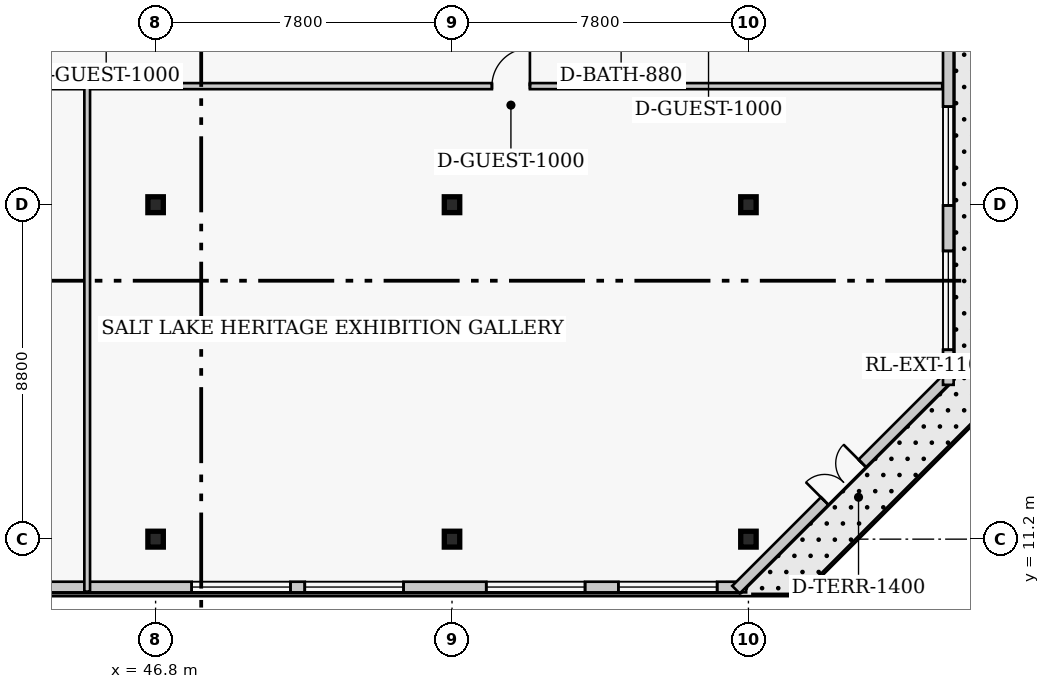
"""IFC4 building model, lengths in metres.
Left out: names, types, materials, properties, quantities, classifications, styles, units other than length and angle.
Written with IfcOpenShell. Run it as: python <this file> out.ifc"""

import sys

from ifc_helpers import new_model, si_unit, direction, frame, frame_2d, origin, origin_2d, place, context, subcontext, project, spatial, rectangle, i_section, extrude, element, fill, save


model = new_model("IFC4")
c1 = context("Model", 3, precision=1e-05, world=origin(), true_north=direction((0.0, 1.0)))
c2 = subcontext(c1, "Body", "Model", "MODEL_VIEW")
j1 = project(units=[si_unit("LENGTHUNIT", "METRE"), si_unit("PLANEANGLEUNIT", "RADIAN")], contexts=[c1])
p1 = place(None, origin())
s1 = spatial("IfcSite", under=j1, at=p1, CompositionType="ELEMENT")
p2 = place(p1, origin())
s2 = spatial("IfcBuilding", under=s1, at=p2, CompositionType="ELEMENT")
p3 = place(p2, frame((0.0, 0.0, 302.0)))
s3 = spatial("IfcBuildingStorey", under=s2, at=p3, CompositionType="ELEMENT", Elevation=302.0)
for number, where, z_axis, x_axis in (
    (1, (46.8, 11.2, 0.0), (0.0, 0.0, 1.0), (1.0, 0.0, 0.0)),
    (2, (46.8, 20.0, 0.0), (0.0, 0.0, 1.0), (1.0, 0.0, 0.0)),
    (3, (54.6, 11.2, 0.0), (0.0, 0.0, 1.0), (1.0, 0.0, 0.0)),
    (4, (54.6, 20.0, 0.0), (0.0, 0.0, 1.0), (1.0, 0.0, 0.0)),
    (5, (62.4, 11.2, 0.0), (0.0, 0.0, 1.0), (1.0, 0.0, 0.0)),
    (6, (62.4, 20.0, 0.0), (0.0, 0.0, 1.0), (1.0, 0.0, 0.0)),
):
    element("IfcColumn", number, at=place(p3, frame(where, z_axis=z_axis, x_axis=x_axis)), inside=s3, PredefinedType="COLUMN", context=c2, shape_type="SweptSolid", body=[
        extrude(i_section(OverallWidth=0.406, OverallDepth=0.417, WebThickness=0.03, FlangeThickness=0.048, FilletRadius=0.017, at=origin_2d()), origin(), (0.0, 0.0, 1.0), 4.6),
    ])
p4 = place(p3, frame((41.71, 9.94, 0.0), z_axis=(0.0, 0.0, 1.0), x_axis=(1.0, 0.0, 0.0)))
e7 = element("IfcWall", 7, at=p4, inside=s3, PredefinedType="SOLIDWALL", context=c2, shape_type="SweptSolid", body=[
    extrude(rectangle(XDim=20.63, YDim=0.28, at=frame_2d((10.315, 0.0))), origin(), (0.0, 0.0, 1.0), 4.31),
])
p5 = place(p4, frame((6.039, 0.0, 0.65)))
e8 = element("IfcOpeningElement", 8, at=p5, cuts=e7, PredefinedType="OPENING", context=c2, shape_type="SweptSolid", body=[
    extrude(rectangle(XDim=2.6, YDim=2.2, at=frame_2d((1.3, 1.1))), frame((0.0, 0.15, 0.0), z_axis=(0.0, -1.0, 0.0), x_axis=(1.0, 0.0, 0.0)), (0.0, 0.0, 1.0), 0.3),
])
p6 = place(p4, frame((9.015, 0.0, 0.65)))
e9 = element("IfcOpeningElement", 9, at=p6, cuts=e7, PredefinedType="OPENING", context=c2, shape_type="SweptSolid", body=[
    extrude(rectangle(XDim=2.6, YDim=2.2, at=frame_2d((1.3, 1.1))), frame((0.0, 0.15, 0.0), z_axis=(0.0, -1.0, 0.0), x_axis=(1.0, 0.0, 0.0)), (0.0, 0.0, 1.0), 0.3),
])
p7 = place(p4, frame((13.791, 0.0, 0.65)))
e10 = element("IfcOpeningElement", 10, at=p7, cuts=e7, PredefinedType="OPENING", context=c2, shape_type="SweptSolid", body=[
    extrude(rectangle(XDim=2.6, YDim=2.2, at=frame_2d((1.3, 1.1))), frame((0.0, 0.15, 0.0), z_axis=(0.0, -1.0, 0.0), x_axis=(1.0, 0.0, 0.0)), (0.0, 0.0, 1.0), 0.3),
])
p8 = place(p4, frame((17.267, 0.0, 0.65)))
e11 = element("IfcOpeningElement", 11, at=p8, cuts=e7, PredefinedType="OPENING", context=c2, shape_type="SweptSolid", body=[
    extrude(rectangle(XDim=2.6, YDim=2.2, at=frame_2d((1.3, 1.1))), frame((0.0, 0.15, 0.0), z_axis=(0.0, -1.0, 0.0), x_axis=(1.0, 0.0, 0.0)), (0.0, 0.0, 1.0), 0.3),
])
p9 = place(p3, frame((62.073, 9.871, 0.0), z_axis=(0.0, 0.0, 1.0), x_axis=(0.707091521591, 0.707122040453, 0.0)))
e12 = element("IfcWall", 12, at=p9, inside=s3, PredefinedType="SOLIDWALL", context=c2, shape_type="SweptSolid", body=[
    extrude(rectangle(XDim=8.0, YDim=0.28, at=frame_2d((4.0, 0.0))), origin(), (0.0, 0.0, 1.0), 4.31),
])
p10 = place(p9, frame((3.3, 0.0, 0.0)))
e13 = element("IfcOpeningElement", 13, at=p10, cuts=e12, PredefinedType="OPENING", context=c2, shape_type="SweptSolid", body=[
    extrude(rectangle(XDim=1.4, YDim=2.15, at=frame_2d((0.7, 1.075))), frame((0.0, 0.15, 0.0), z_axis=(0.0, -1.0, 0.0), x_axis=(1.0, 0.0, 0.0)), (0.0, 0.0, 1.0), 0.3),
])
p11 = place(p3, frame((67.66, 15.26, 0.0), z_axis=(0.0, 0.0, 1.0), x_axis=(0.0, 1.0, 0.0)))
e14 = element("IfcWall", 14, at=p11, inside=s3, PredefinedType="SOLIDWALL", context=c2, shape_type="SweptSolid", body=[
    extrude(rectangle(XDim=26.68, YDim=0.28, at=frame_2d((13.34, 0.0))), origin(), (0.0, 0.0, 1.0), 4.31),
])
p12 = place(p11, frame((0.923, 0.0, 0.65)))
e15 = element("IfcOpeningElement", 15, at=p12, cuts=e14, PredefinedType="OPENING", context=c2, shape_type="SweptSolid", body=[
    extrude(rectangle(XDim=2.6, YDim=2.2, at=frame_2d((1.3, 1.1))), frame((0.0, 0.15, 0.0), z_axis=(0.0, -1.0, 0.0), x_axis=(1.0, 0.0, 0.0)), (0.0, 0.0, 1.0), 0.3),
])
p13 = place(p11, frame((4.72, 0.0, 0.65)))
e16 = element("IfcOpeningElement", 16, at=p13, cuts=e14, PredefinedType="OPENING", context=c2, shape_type="SweptSolid", body=[
    extrude(rectangle(XDim=2.6, YDim=2.2, at=frame_2d((1.3, 1.1))), frame((0.0, 0.15, 0.0), z_axis=(0.0, -1.0, 0.0), x_axis=(1.0, 0.0, 0.0)), (0.0, 0.0, 1.0), 0.3),
])
p14 = place(p11, frame((10.467, 0.0, 0.65)))
e17 = element("IfcOpeningElement", 17, at=p14, cuts=e14, PredefinedType="OPENING", context=c2, shape_type="SweptSolid", body=[
    extrude(rectangle(XDim=2.6, YDim=2.2, at=frame_2d((1.3, 1.1))), frame((0.0, 0.15, 0.0), z_axis=(0.0, -1.0, 0.0), x_axis=(1.0, 0.0, 0.0)), (0.0, 0.0, 1.0), 0.3),
])
p15 = place(p11, frame((14.263, 0.0, 0.65)))
e18 = element("IfcOpeningElement", 18, at=p15, cuts=e14, PredefinedType="OPENING", context=c2, shape_type="SweptSolid", body=[
    extrude(rectangle(XDim=2.6, YDim=2.2, at=frame_2d((1.3, 1.1))), frame((0.0, 0.15, 0.0), z_axis=(0.0, -1.0, 0.0), x_axis=(1.0, 0.0, 0.0)), (0.0, 0.0, 1.0), 0.3),
])
p16 = place(p11, frame((18.71, 0.0, 0.65)))
e19 = element("IfcOpeningElement", 19, at=p16, cuts=e14, PredefinedType="OPENING", context=c2, shape_type="SweptSolid", body=[
    extrude(rectangle(XDim=2.6, YDim=2.2, at=frame_2d((1.3, 1.1))), frame((0.0, 0.15, 0.0), z_axis=(0.0, -1.0, 0.0), x_axis=(1.0, 0.0, 0.0)), (0.0, 0.0, 1.0), 0.3),
])
p17 = place(p11, frame((23.157, 0.0, 0.65)))
e20 = element("IfcOpeningElement", 20, at=p17, cuts=e14, PredefinedType="OPENING", context=c2, shape_type="SweptSolid", body=[
    extrude(rectangle(XDim=2.6, YDim=2.2, at=frame_2d((1.3, 1.1))), frame((0.0, 0.15, 0.0), z_axis=(0.0, -1.0, 0.0), x_axis=(1.0, 0.0, 0.0)), (0.0, 0.0, 1.0), 0.3),
])
p18 = place(p3, frame((10.5, 23.12, 0.0), z_axis=(0.0, 0.0, 1.0), x_axis=(1.0, 0.0, 0.0)))
e21 = element("IfcWall", 21, at=p18, inside=s3, PredefinedType="PARTITIONING", context=c2, shape_type="SweptSolid", body=[
    extrude(rectangle(XDim=57.0, YDim=0.16, at=frame_2d((28.5, 0.0))), origin(), (0.0, 0.0, 1.0), 4.31),
])
p19 = place(p18, frame((8.85, 0.0, 0.0)))
e22 = element("IfcOpeningElement", 22, at=p19, cuts=e21, PredefinedType="OPENING", context=c2, shape_type="SweptSolid", body=[
    extrude(rectangle(XDim=1.0, YDim=2.15, at=frame_2d((0.5, 1.075))), frame((0.0, 0.09, 0.0), z_axis=(0.0, -1.0, 0.0), x_axis=(1.0, 0.0, 0.0)), (0.0, 0.0, 1.0), 0.18),
])
p20 = place(p18, frame((26.0, 0.0, 0.0)))
e23 = element("IfcOpeningElement", 23, at=p20, cuts=e21, PredefinedType="OPENING", context=c2, shape_type="SweptSolid", body=[
    extrude(rectangle(XDim=1.0, YDim=2.15, at=frame_2d((0.5, 1.075))), frame((0.0, 0.09, 0.0), z_axis=(0.0, -1.0, 0.0), x_axis=(1.0, 0.0, 0.0)), (0.0, 0.0, 1.0), 0.18),
])
p21 = place(p18, frame((45.15, 0.0, 0.0)))
e24 = element("IfcOpeningElement", 24, at=p21, cuts=e21, PredefinedType="OPENING", context=c2, shape_type="SweptSolid", body=[
    extrude(rectangle(XDim=1.0, YDim=2.15, at=frame_2d((0.5, 1.075))), frame((0.0, 0.09, 0.0), z_axis=(0.0, -1.0, 0.0), x_axis=(1.0, 0.0, 0.0)), (0.0, 0.0, 1.0), 0.18),
])
p22 = place(p3, frame((45.0, 9.82, 0.0), z_axis=(0.0, 0.0, 1.0), x_axis=(0.0, 1.0, 0.0)))
e25 = element("IfcWall", 25, at=p22, inside=s3, PredefinedType="PARTITIONING", context=c2, shape_type="SweptSolid", body=[
    extrude(rectangle(XDim=13.3, YDim=0.15, at=frame_2d((6.65, 0.0))), origin(), (0.0, 0.0, 1.0), 4.31),
])
p23 = place(p5, origin())
e26 = element("IfcWindow", 26, at=p23, inside=s3, PartitioningType="SINGLE_PANEL", PredefinedType="WINDOW", context=c2, shape_type="SweptSolid", body=[
    extrude(rectangle(XDim=2.6, YDim=2.2, at=frame_2d((1.3, 1.1))), frame((0.0, 0.03, 0.0), z_axis=(0.0, -1.0, 0.0), x_axis=(1.0, 0.0, 0.0)), (0.0, 0.0, 1.0), 0.06),
])
fill(e8, e26)
p24 = place(p6, origin())
e27 = element("IfcWindow", 27, at=p24, inside=s3, PartitioningType="SINGLE_PANEL", PredefinedType="WINDOW", context=c2, shape_type="SweptSolid", body=[
    extrude(rectangle(XDim=2.6, YDim=2.2, at=frame_2d((1.3, 1.1))), frame((0.0, 0.03, 0.0), z_axis=(0.0, -1.0, 0.0), x_axis=(1.0, 0.0, 0.0)), (0.0, 0.0, 1.0), 0.06),
])
fill(e9, e27)
p25 = place(p7, origin())
e28 = element("IfcWindow", 28, at=p25, inside=s3, PartitioningType="SINGLE_PANEL", PredefinedType="WINDOW", context=c2, shape_type="SweptSolid", body=[
    extrude(rectangle(XDim=2.6, YDim=2.2, at=frame_2d((1.3, 1.1))), frame((0.0, 0.03, 0.0), z_axis=(0.0, -1.0, 0.0), x_axis=(1.0, 0.0, 0.0)), (0.0, 0.0, 1.0), 0.06),
])
fill(e10, e28)
p26 = place(p8, origin())
e29 = element("IfcWindow", 29, at=p26, inside=s3, PartitioningType="SINGLE_PANEL", PredefinedType="WINDOW", context=c2, shape_type="SweptSolid", body=[
    extrude(rectangle(XDim=2.6, YDim=2.2, at=frame_2d((1.3, 1.1))), frame((0.0, 0.03, 0.0), z_axis=(0.0, -1.0, 0.0), x_axis=(1.0, 0.0, 0.0)), (0.0, 0.0, 1.0), 0.06),
])
fill(e11, e29)
p27 = place(p10, origin())
e30 = element("IfcDoor", 30, at=p27, inside=s3, OperationType="DOUBLE_DOOR_SINGLE_SWING", PredefinedType="DOOR", context=c2, shape_type="SweptSolid", body=[
    extrude(rectangle(XDim=1.4, YDim=2.15, at=frame_2d((0.7, 1.075))), frame((0.0, 0.025, 0.0), z_axis=(0.0, -1.0, 0.0), x_axis=(1.0, 0.0, 0.0)), (0.0, 0.0, 1.0), 0.05),
])
fill(e13, e30)
p28 = place(p12, origin())
e31 = element("IfcWindow", 31, at=p28, inside=s3, PartitioningType="SINGLE_PANEL", PredefinedType="WINDOW", context=c2, shape_type="SweptSolid", body=[
    extrude(rectangle(XDim=2.6, YDim=2.2, at=frame_2d((1.3, 1.1))), frame((0.0, 0.03, 0.0), z_axis=(0.0, -1.0, 0.0), x_axis=(1.0, 0.0, 0.0)), (0.0, 0.0, 1.0), 0.06),
])
fill(e15, e31)
p29 = place(p13, origin())
e32 = element("IfcWindow", 32, at=p29, inside=s3, PartitioningType="SINGLE_PANEL", PredefinedType="WINDOW", context=c2, shape_type="SweptSolid", body=[
    extrude(rectangle(XDim=2.6, YDim=2.2, at=frame_2d((1.3, 1.1))), frame((0.0, 0.03, 0.0), z_axis=(0.0, -1.0, 0.0), x_axis=(1.0, 0.0, 0.0)), (0.0, 0.0, 1.0), 0.06),
])
fill(e16, e32)
p30 = place(p21, origin())
e33 = element("IfcDoor", 33, at=p30, inside=s3, OperationType="SINGLE_SWING_RIGHT", PredefinedType="DOOR", context=c2, shape_type="SweptSolid", body=[
    extrude(rectangle(XDim=1.0, YDim=2.15, at=frame_2d((0.5, 1.075))), frame((0.0, 0.025, 0.0), z_axis=(0.0, -1.0, 0.0), x_axis=(1.0, 0.0, 0.0)), (0.0, 0.0, 1.0), 0.05),
])
fill(e24, e33)
save(model, sys.argv[1])
